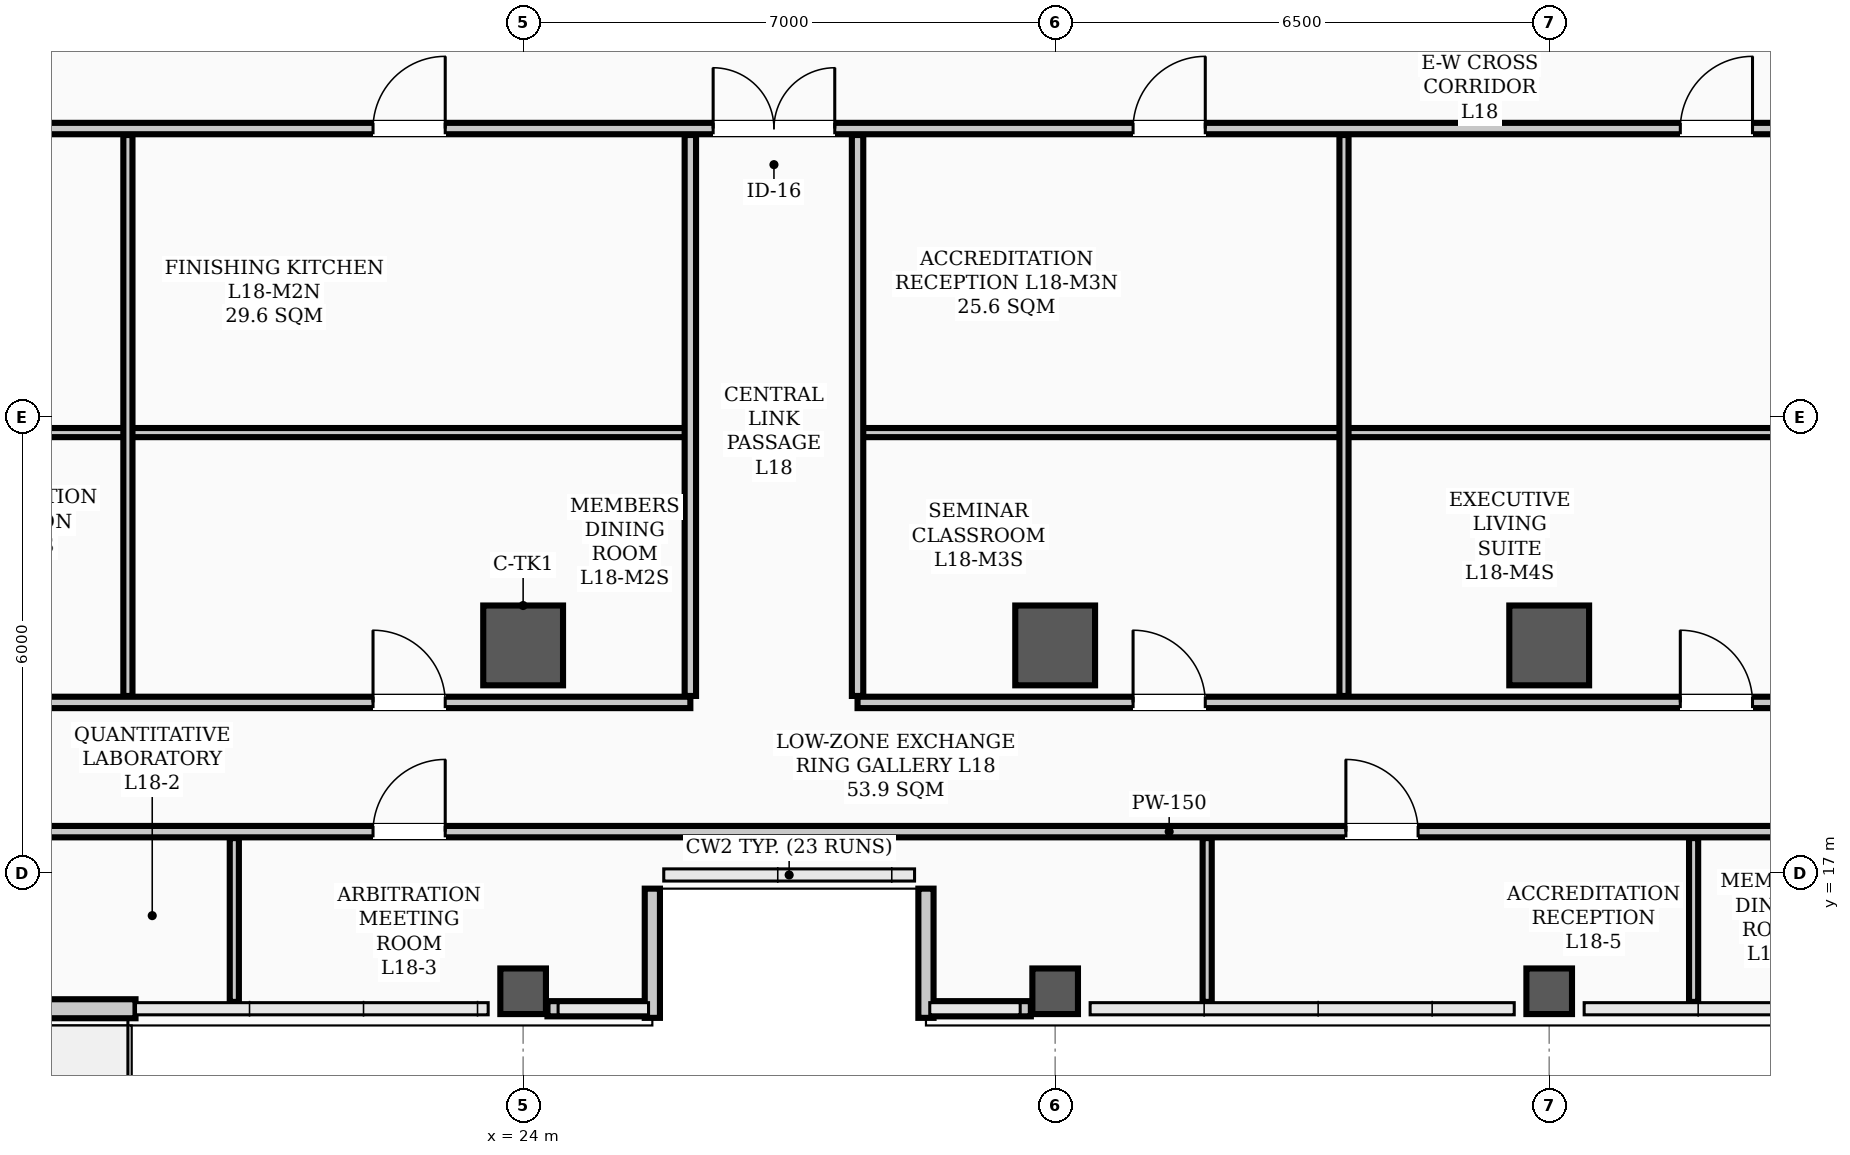
"""IFC4 building model, lengths in metres.
Left out: names, types, materials, properties, quantities, classifications, styles, units other than length and angle.
Written with IfcOpenShell. Run it as: python <this file> out.ifc"""

import sys

from ifc_helpers import new_model, si_unit, direction, frame, frame_2d, origin, origin_2d, place, context, subcontext, project, spatial, rectangle, hollow_rectangle, extrude, element, fill, save


model = new_model("IFC4")
c1 = context("Model", 3, precision=1e-05, world=origin(), true_north=direction((0.0, 1.0)))
c2 = subcontext(c1, "Body", "Model", "MODEL_VIEW")
j1 = project(units=[si_unit("LENGTHUNIT", "METRE"), si_unit("PLANEANGLEUNIT", "RADIAN")], contexts=[c1])
p1 = place(None, origin())
s1 = spatial("IfcSite", under=j1, at=p1, CompositionType="ELEMENT")
p2 = place(p1, origin())
s2 = spatial("IfcBuilding", under=s1, at=p2, CompositionType="ELEMENT")
p3 = place(p2, frame((0.0, 0.0, 73.3)))
s3 = spatial("IfcBuildingStorey", under=s2, at=p3, CompositionType="ELEMENT", Elevation=73.3)
for number, where, z_axis, x_axis in (
    (1, (24.0, 20.0, 0.0), (0.0, 0.0, 1.0), (1.0, 0.0, 0.0)),
    (2, (31.0, 20.0, 0.0), (0.0, 0.0, 1.0), (1.0, 0.0, 0.0)),
    (3, (37.5, 20.0, 0.0), (0.0, 0.0, 1.0), (1.0, 0.0, 0.0)),
):
    element("IfcColumn", number, at=place(p3, frame(where, z_axis=z_axis, x_axis=x_axis)), inside=s3, PredefinedType="COLUMN", context=c2, shape_type="SweptSolid", body=[
        extrude(hollow_rectangle(XDim=1.05, YDim=1.05, WallThickness=0.038, InnerFilletRadius=0.019, OuterFilletRadius=0.057, at=origin_2d()), origin(), (0.0, 0.0, 1.0), 3.9),
    ])
for number, where, z_axis, x_axis in (
    (4, (24.0, 15.45, 0.0), (0.0, 0.0, 1.0), (1.0, 0.0, 0.0)),
    (5, (31.0, 15.45, 0.0), (0.0, 0.0, 1.0), (1.0, 0.0, 0.0)),
    (6, (37.5, 15.45, 0.0), (0.0, 0.0, 1.0), (1.0, 0.0, 0.0)),
):
    element("IfcColumn", number, at=place(p3, frame(where, z_axis=z_axis, x_axis=x_axis)), inside=s3, PredefinedType="COLUMN", context=c2, shape_type="SweptSolid", body=[
        extrude(hollow_rectangle(XDim=0.6, YDim=0.6, WallThickness=0.026, InnerFilletRadius=0.013, OuterFilletRadius=0.039, at=origin_2d()), origin(), (0.0, 0.0, 1.0), 3.9),
    ])
for number, where, z_axis, x_axis in (
    (7, (24.32, 15.22, 0.0), (0.0, 0.0, 1.0), (1.0, 0.0, 0.0)),
    (8, (29.35, 15.22, 0.0), (0.0, 0.0, 1.0), (1.0, 0.0, 0.0)),
):
    element("IfcWall", number, at=place(p3, frame(where, z_axis=z_axis, x_axis=x_axis)), inside=s3, PredefinedType="PARAPET", context=c2, shape_type="SweptSolid", body=[
        extrude(rectangle(XDim=1.33, YDim=0.2, at=frame_2d((0.665, 0.0))), origin(), (0.0, 0.0, 1.0), 1.2),
    ])
for number, where, z_axis, x_axis in (
    (9, (25.7, 15.1, 0.0), (0.0, 0.0, 1.0), (0.0, 1.0, 0.0)),
    (10, (29.3, 16.8, 0.0), (0.0, 0.0, 1.0), (0.0, -1.0, 0.0)),
):
    element("IfcWall", number, at=place(p3, frame(where, z_axis=z_axis, x_axis=x_axis)), inside=s3, PredefinedType="PARAPET", context=c2, shape_type="SweptSolid", body=[
        extrude(rectangle(XDim=1.7, YDim=0.2, at=frame_2d((0.85, 0.0))), origin(), (0.0, 0.0, 1.0), 1.2),
    ])
p4 = place(p3, frame((15.2, 15.22, 0.0), z_axis=(0.0, 0.0, 1.0), x_axis=(1.0, 0.0, 0.0)))
e11 = element("IfcWall", 11, at=p4, inside=s3, PredefinedType="STANDARD", context=c2, shape_type="SweptSolid", body=[
    extrude(rectangle(XDim=3.7, YDim=0.25, at=frame_2d((1.85, 0.0))), origin(), (0.0, 0.0, 1.0), 3.18),
])
p5 = place(p4, frame((1.3, 0.0, 0.0)))
e12 = element("IfcOpeningElement", 12, at=p5, cuts=e11, PredefinedType="OPENING", context=c2, shape_type="SweptSolid", body=[
    extrude(rectangle(XDim=1.1, YDim=2.2, at=frame_2d((0.55, 1.1))), frame((0.0, 0.135, 0.0), z_axis=(0.0, -1.0, 0.0), x_axis=(1.0, 0.0, 0.0)), (0.0, 0.0, 1.0), 0.27),
])
p6 = place(p3, frame((12.9, 26.8, 0.0), z_axis=(0.0, 0.0, 1.0), x_axis=(1.0, 0.0, 0.0)))
e13 = element("IfcWall", 13, at=p6, inside=s3, PredefinedType="PARTITIONING", context=c2, shape_type="SweptSolid", body=[
    extrude(rectangle(XDim=31.7, YDim=0.15, at=frame_2d((15.85, 0.0))), origin(), (0.0, 0.0, 1.0), 3.1),
])
p7 = place(p6, frame((13.6, 0.0, 0.0)))
e14 = element("IfcOpeningElement", 14, at=p7, cuts=e13, PredefinedType="OPENING", context=c2, shape_type="SweptSolid", body=[
    extrude(rectangle(XDim=1.6, YDim=2.08, at=frame_2d((0.8, 1.04))), frame((0.0, 0.085, 0.0), z_axis=(0.0, -1.0, 0.0), x_axis=(1.0, 0.0, 0.0)), (0.0, 0.0, 1.0), 0.17),
])
p8 = place(p6, frame((2.475, 0.0, 0.0)))
e15 = element("IfcOpeningElement", 15, at=p8, cuts=e13, PredefinedType="OPENING", context=c2, shape_type="SweptSolid", body=[
    extrude(rectangle(XDim=0.95, YDim=2.08, at=frame_2d((0.475, 1.04))), frame((0.0, 0.085, 0.0), z_axis=(0.0, -1.0, 0.0), x_axis=(1.0, 0.0, 0.0)), (0.0, 0.0, 1.0), 0.17),
])
p9 = place(p6, frame((9.125, 0.0, 0.0)))
e16 = element("IfcOpeningElement", 16, at=p9, cuts=e13, PredefinedType="OPENING", context=c2, shape_type="SweptSolid", body=[
    extrude(rectangle(XDim=0.95, YDim=2.08, at=frame_2d((0.475, 1.04))), frame((0.0, 0.085, 0.0), z_axis=(0.0, -1.0, 0.0), x_axis=(1.0, 0.0, 0.0)), (0.0, 0.0, 1.0), 0.17),
])
p10 = place(p6, frame((19.125, 0.0, 0.0)))
e17 = element("IfcOpeningElement", 17, at=p10, cuts=e13, PredefinedType="OPENING", context=c2, shape_type="SweptSolid", body=[
    extrude(rectangle(XDim=0.95, YDim=2.08, at=frame_2d((0.475, 1.04))), frame((0.0, 0.085, 0.0), z_axis=(0.0, -1.0, 0.0), x_axis=(1.0, 0.0, 0.0)), (0.0, 0.0, 1.0), 0.17),
])
p11 = place(p6, frame((26.325, 0.0, 0.0)))
e18 = element("IfcOpeningElement", 18, at=p11, cuts=e13, PredefinedType="OPENING", context=c2, shape_type="SweptSolid", body=[
    extrude(rectangle(XDim=0.95, YDim=2.08, at=frame_2d((0.475, 1.04))), frame((0.0, 0.085, 0.0), z_axis=(0.0, -1.0, 0.0), x_axis=(1.0, 0.0, 0.0)), (0.0, 0.0, 1.0), 0.17),
])
p12 = place(p3, frame((10.16, 17.55, 0.0), z_axis=(0.0, 0.0, 1.0), x_axis=(1.0, 0.0, 0.0)))
e19 = element("IfcWall", 19, at=p12, inside=s3, PredefinedType="PARTITIONING", context=c2, shape_type="SweptSolid", body=[
    extrude(rectangle(XDim=44.68, YDim=0.15, at=frame_2d((22.34, 0.0))), origin(), (0.0, 0.0, 1.0), 3.1),
])
p13 = place(p12, frame((2.04, 0.0, 0.0)))
e20 = element("IfcOpeningElement", 20, at=p13, cuts=e19, PredefinedType="OPENING", context=c2, shape_type="SweptSolid", body=[
    extrude(rectangle(XDim=0.95, YDim=2.08, at=frame_2d((0.475, 1.04))), frame((0.0, 0.085, 0.0), z_axis=(0.0, -1.0, 0.0), x_axis=(1.0, 0.0, 0.0)), (0.0, 0.0, 1.0), 0.17),
])
p14 = place(p12, frame((6.565, 0.0, 0.0)))
e21 = element("IfcOpeningElement", 21, at=p14, cuts=e19, PredefinedType="OPENING", context=c2, shape_type="SweptSolid", body=[
    extrude(rectangle(XDim=0.95, YDim=2.08, at=frame_2d((0.475, 1.04))), frame((0.0, 0.085, 0.0), z_axis=(0.0, -1.0, 0.0), x_axis=(1.0, 0.0, 0.0)), (0.0, 0.0, 1.0), 0.17),
])
p15 = place(p12, frame((11.865, 0.0, 0.0)))
e22 = element("IfcOpeningElement", 22, at=p15, cuts=e19, PredefinedType="OPENING", context=c2, shape_type="SweptSolid", body=[
    extrude(rectangle(XDim=0.95, YDim=2.08, at=frame_2d((0.475, 1.04))), frame((0.0, 0.085, 0.0), z_axis=(0.0, -1.0, 0.0), x_axis=(1.0, 0.0, 0.0)), (0.0, 0.0, 1.0), 0.17),
])
p16 = place(p12, frame((24.665, 0.0, 0.0)))
e23 = element("IfcOpeningElement", 23, at=p16, cuts=e19, PredefinedType="OPENING", context=c2, shape_type="SweptSolid", body=[
    extrude(rectangle(XDim=0.95, YDim=2.08, at=frame_2d((0.475, 1.04))), frame((0.0, 0.085, 0.0), z_axis=(0.0, -1.0, 0.0), x_axis=(1.0, 0.0, 0.0)), (0.0, 0.0, 1.0), 0.17),
])
p17 = place(p12, frame((31.765, 0.0, 0.0)))
e24 = element("IfcOpeningElement", 24, at=p17, cuts=e19, PredefinedType="OPENING", context=c2, shape_type="SweptSolid", body=[
    extrude(rectangle(XDim=0.95, YDim=2.08, at=frame_2d((0.475, 1.04))), frame((0.0, 0.085, 0.0), z_axis=(0.0, -1.0, 0.0), x_axis=(1.0, 0.0, 0.0)), (0.0, 0.0, 1.0), 0.17),
])
p18 = place(p3, frame((12.9, 19.25, 0.0), z_axis=(0.0, 0.0, 1.0), x_axis=(1.0, 0.0, 0.0)))
e25 = element("IfcWall", 25, at=p18, inside=s3, PredefinedType="PARTITIONING", context=c2, shape_type="SweptSolid", body=[
    extrude(rectangle(XDim=13.3, YDim=0.15, at=frame_2d((6.65, 0.0))), origin(), (0.0, 0.0, 1.0), 3.1),
])
p19 = place(p18, frame((2.475, 0.0, 0.0)))
e26 = element("IfcOpeningElement", 26, at=p19, cuts=e25, PredefinedType="OPENING", context=c2, shape_type="SweptSolid", body=[
    extrude(rectangle(XDim=0.95, YDim=2.08, at=frame_2d((0.475, 1.04))), frame((0.0, 0.085, 0.0), z_axis=(0.0, -1.0, 0.0), x_axis=(1.0, 0.0, 0.0)), (0.0, 0.0, 1.0), 0.17),
])
p20 = place(p18, frame((9.125, 0.0, 0.0)))
e27 = element("IfcOpeningElement", 27, at=p20, cuts=e25, PredefinedType="OPENING", context=c2, shape_type="SweptSolid", body=[
    extrude(rectangle(XDim=0.95, YDim=2.08, at=frame_2d((0.475, 1.04))), frame((0.0, 0.085, 0.0), z_axis=(0.0, -1.0, 0.0), x_axis=(1.0, 0.0, 0.0)), (0.0, 0.0, 1.0), 0.17),
])
p21 = place(p3, frame((28.4, 19.25, 0.0), z_axis=(0.0, 0.0, 1.0), x_axis=(1.0, 0.0, 0.0)))
e28 = element("IfcWall", 28, at=p21, inside=s3, PredefinedType="PARTITIONING", context=c2, shape_type="SweptSolid", body=[
    extrude(rectangle(XDim=16.2, YDim=0.15, at=frame_2d((8.1, 0.0))), origin(), (0.0, 0.0, 1.0), 3.1),
])
p22 = place(p21, frame((3.625, 0.0, 0.0)))
e29 = element("IfcOpeningElement", 29, at=p22, cuts=e28, PredefinedType="OPENING", context=c2, shape_type="SweptSolid", body=[
    extrude(rectangle(XDim=0.95, YDim=2.08, at=frame_2d((0.475, 1.04))), frame((0.0, 0.085, 0.0), z_axis=(0.0, -1.0, 0.0), x_axis=(1.0, 0.0, 0.0)), (0.0, 0.0, 1.0), 0.17),
])
p23 = place(p21, frame((10.825, 0.0, 0.0)))
e30 = element("IfcOpeningElement", 30, at=p23, cuts=e28, PredefinedType="OPENING", context=c2, shape_type="SweptSolid", body=[
    extrude(rectangle(XDim=0.95, YDim=2.08, at=frame_2d((0.475, 1.04))), frame((0.0, 0.085, 0.0), z_axis=(0.0, -1.0, 0.0), x_axis=(1.0, 0.0, 0.0)), (0.0, 0.0, 1.0), 0.17),
])
p24 = place(p3, frame((12.9, 22.8, 0.0), z_axis=(0.0, 0.0, 1.0), x_axis=(1.0, 0.0, 0.0)))
e31 = element("IfcWall", 31, at=p24, inside=s3, PredefinedType="PARTITIONING", context=c2, shape_type="SweptSolid", body=[
    extrude(rectangle(XDim=5.9, YDim=0.12, at=frame_2d((2.95, 0.0))), origin(), (0.0, 0.0, 1.0), 3.1),
])
p25 = place(p3, frame((18.8, 22.8, 0.0), z_axis=(0.0, 0.0, 1.0), x_axis=(1.0, 0.0, 0.0)))
e32 = element("IfcWall", 32, at=p25, inside=s3, PredefinedType="PARTITIONING", context=c2, shape_type="SweptSolid", body=[
    extrude(rectangle(XDim=7.4, YDim=0.12, at=frame_2d((3.7, 0.0))), origin(), (0.0, 0.0, 1.0), 3.1),
])
p26 = place(p3, frame((28.4, 22.8, 0.0), z_axis=(0.0, 0.0, 1.0), x_axis=(1.0, 0.0, 0.0)))
e33 = element("IfcWall", 33, at=p26, inside=s3, PredefinedType="PARTITIONING", context=c2, shape_type="SweptSolid", body=[
    extrude(rectangle(XDim=6.4, YDim=0.12, at=frame_2d((3.2, 0.0))), origin(), (0.0, 0.0, 1.0), 3.1),
])
p27 = place(p3, frame((34.8, 22.8, 0.0), z_axis=(0.0, 0.0, 1.0), x_axis=(1.0, 0.0, 0.0)))
e34 = element("IfcWall", 34, at=p27, inside=s3, PredefinedType="PARTITIONING", context=c2, shape_type="SweptSolid", body=[
    extrude(rectangle(XDim=9.8, YDim=0.12, at=frame_2d((4.9, 0.0))), origin(), (0.0, 0.0, 1.0), 3.1),
])
for number, where, z_axis, x_axis in (
    (35, (26.2, 19.335, 0.0), (0.0, 0.0, 1.0), (0.0, 1.0, 0.0)),
    (36, (28.4, 19.335, 0.0), (0.0, 0.0, 1.0), (0.0, 1.0, 0.0)),
):
    element("IfcWall", number, at=place(p3, frame(where, z_axis=z_axis, x_axis=x_axis)), inside=s3, PredefinedType="PARTITIONING", context=c2, shape_type="SweptSolid", body=[
        extrude(rectangle(XDim=7.38, YDim=0.15, at=frame_2d((3.69, 0.0))), origin(), (0.0, 0.0, 1.0), 3.0),
    ])
for number, where, z_axis, x_axis in (
    (37, (20.2, 15.31, 0.0), (0.0, 0.0, 1.0), (0.0, 1.0, 0.0)),
    (38, (33.0, 15.31, 0.0), (0.0, 0.0, 1.0), (0.0, 1.0, 0.0)),
    (39, (39.4, 15.31, 0.0), (0.0, 0.0, 1.0), (0.0, 1.0, 0.0)),
):
    element("IfcWall", number, at=place(p3, frame(where, z_axis=z_axis, x_axis=x_axis)), inside=s3, PredefinedType="PARTITIONING", context=c2, shape_type="SweptSolid", body=[
        extrude(rectangle(XDim=2.155, YDim=0.12, at=frame_2d((1.078, 0.0))), origin(), (0.0, 0.0, 1.0), 3.212),
    ])
for number, where, z_axis, x_axis in (
    (40, (18.8, 19.335, 0.0), (0.0, 0.0, 1.0), (0.0, 1.0, 0.0)),
    (41, (34.8, 19.335, 0.0), (0.0, 0.0, 1.0), (0.0, 1.0, 0.0)),
):
    element("IfcWall", number, at=place(p3, frame(where, z_axis=z_axis, x_axis=x_axis)), inside=s3, PredefinedType="PARTITIONING", context=c2, shape_type="SweptSolid", body=[
        extrude(rectangle(XDim=7.38, YDim=0.12, at=frame_2d((3.69, 0.0))), origin(), (0.0, 0.0, 1.0), 3.0),
    ])
p28 = place(p7, origin())
e42 = element("IfcDoor", 42, at=p28, inside=s3, OperationType="DOUBLE_DOOR_SINGLE_SWING", PredefinedType="DOOR", context=c2, shape_type="SweptSolid", body=[
    extrude(rectangle(XDim=1.6, YDim=2.08, at=frame_2d((0.8, 1.04))), frame((0.0, 0.025, 0.0), z_axis=(0.0, -1.0, 0.0), x_axis=(1.0, 0.0, 0.0)), (0.0, 0.0, 1.0), 0.05),
])
fill(e14, e42)
p29 = place(p15, origin())
e43 = element("IfcDoor", 43, at=p29, inside=s3, OperationType="SINGLE_SWING_RIGHT", PredefinedType="DOOR", context=c2, shape_type="SweptSolid", body=[
    extrude(rectangle(XDim=0.95, YDim=2.08, at=frame_2d((0.475, 1.04))), frame((0.0, 0.025, 0.0), z_axis=(0.0, -1.0, 0.0), x_axis=(1.0, 0.0, 0.0)), (0.0, 0.0, 1.0), 0.05),
])
fill(e22, e43)
p30 = place(p16, origin())
e44 = element("IfcDoor", 44, at=p30, inside=s3, OperationType="SINGLE_SWING_LEFT", PredefinedType="DOOR", context=c2, shape_type="SweptSolid", body=[
    extrude(rectangle(XDim=0.95, YDim=2.08, at=frame_2d((0.475, 1.04))), frame((0.0, 0.025, 0.0), z_axis=(0.0, -1.0, 0.0), x_axis=(1.0, 0.0, 0.0)), (0.0, 0.0, 1.0), 0.05),
])
fill(e23, e44)
p31 = place(p9, origin())
e45 = element("IfcDoor", 45, at=p31, inside=s3, OperationType="SINGLE_SWING_RIGHT", PredefinedType="DOOR", context=c2, shape_type="SweptSolid", body=[
    extrude(rectangle(XDim=0.95, YDim=2.08, at=frame_2d((0.475, 1.04))), frame((0.0, 0.025, 0.0), z_axis=(0.0, -1.0, 0.0), x_axis=(1.0, 0.0, 0.0)), (0.0, 0.0, 1.0), 0.05),
])
fill(e16, e45)
p32 = place(p20, origin())
e46 = element("IfcDoor", 46, at=p32, inside=s3, OperationType="SINGLE_SWING_LEFT", PredefinedType="DOOR", context=c2, shape_type="SweptSolid", body=[
    extrude(rectangle(XDim=0.95, YDim=2.08, at=frame_2d((0.475, 1.04))), frame((0.0, 0.025, 0.0), z_axis=(0.0, -1.0, 0.0), x_axis=(1.0, 0.0, 0.0)), (0.0, 0.0, 1.0), 0.05),
])
fill(e27, e46)
p33 = place(p10, origin())
e47 = element("IfcDoor", 47, at=p33, inside=s3, OperationType="SINGLE_SWING_RIGHT", PredefinedType="DOOR", context=c2, shape_type="SweptSolid", body=[
    extrude(rectangle(XDim=0.95, YDim=2.08, at=frame_2d((0.475, 1.04))), frame((0.0, 0.025, 0.0), z_axis=(0.0, -1.0, 0.0), x_axis=(1.0, 0.0, 0.0)), (0.0, 0.0, 1.0), 0.05),
])
fill(e17, e47)
p34 = place(p22, origin())
e48 = element("IfcDoor", 48, at=p34, inside=s3, OperationType="SINGLE_SWING_LEFT", PredefinedType="DOOR", context=c2, shape_type="SweptSolid", body=[
    extrude(rectangle(XDim=0.95, YDim=2.08, at=frame_2d((0.475, 1.04))), frame((0.0, 0.025, 0.0), z_axis=(0.0, -1.0, 0.0), x_axis=(1.0, 0.0, 0.0)), (0.0, 0.0, 1.0), 0.05),
])
fill(e29, e48)
p35 = place(p11, origin())
e49 = element("IfcDoor", 49, at=p35, inside=s3, OperationType="SINGLE_SWING_RIGHT", PredefinedType="DOOR", context=c2, shape_type="SweptSolid", body=[
    extrude(rectangle(XDim=0.95, YDim=2.08, at=frame_2d((0.475, 1.04))), frame((0.0, 0.025, 0.0), z_axis=(0.0, -1.0, 0.0), x_axis=(1.0, 0.0, 0.0)), (0.0, 0.0, 1.0), 0.05),
])
fill(e18, e49)
p36 = place(p23, origin())
e50 = element("IfcDoor", 50, at=p36, inside=s3, OperationType="SINGLE_SWING_LEFT", PredefinedType="DOOR", context=c2, shape_type="SweptSolid", body=[
    extrude(rectangle(XDim=0.95, YDim=2.08, at=frame_2d((0.475, 1.04))), frame((0.0, 0.025, 0.0), z_axis=(0.0, -1.0, 0.0), x_axis=(1.0, 0.0, 0.0)), (0.0, 0.0, 1.0), 0.05),
])
fill(e30, e50)
save(model, sys.argv[1])
